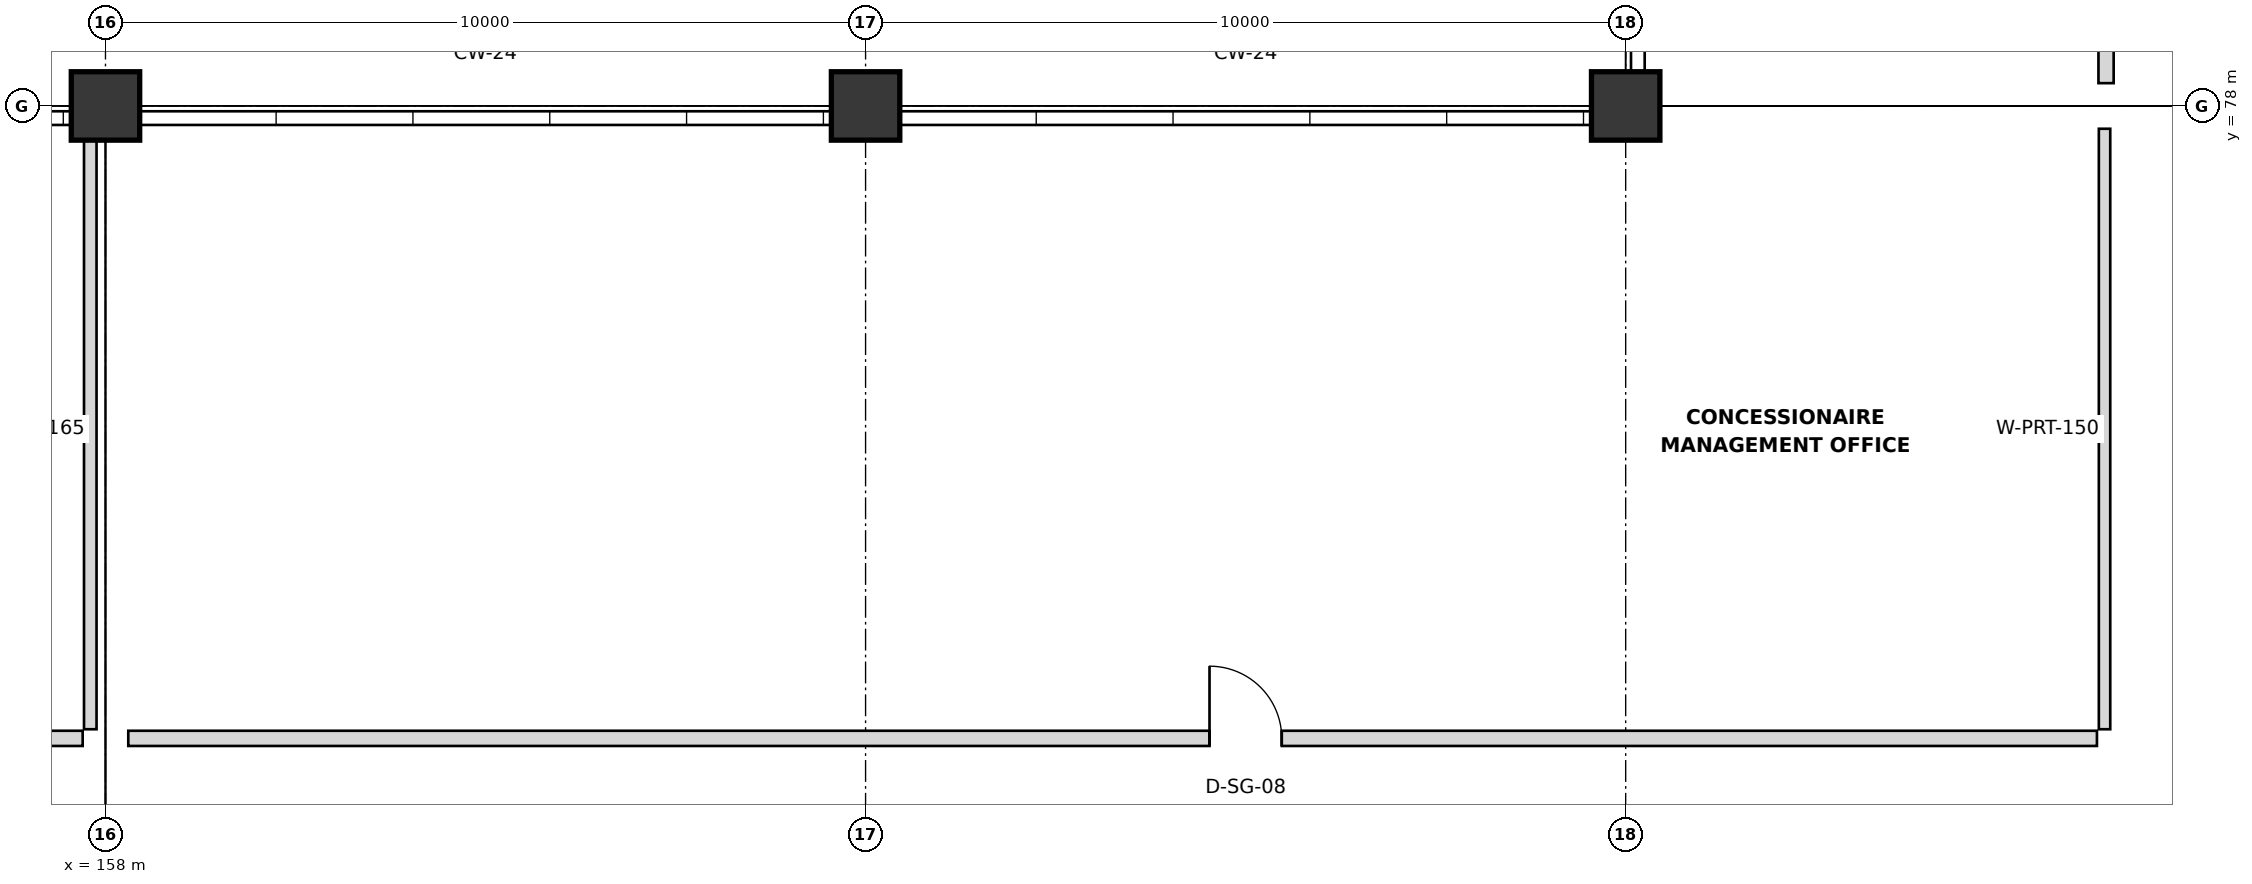
"""IFC4 building model, lengths in metres.
Left out: names, types, materials, properties, quantities, classifications, styles, units other than length and angle.
Written with IfcOpenShell. Run it as: python <this file> out.ifc"""

import sys

from ifc_helpers import new_model, si_unit, direction, frame, frame_2d, origin, origin_2d, place, context, subcontext, project, spatial, rectangle, extrude, element, fill, save


model = new_model("IFC4")
c1 = context("Model", 3, precision=1e-05, world=origin(), true_north=direction((0.0, 1.0)))
c2 = subcontext(c1, "Body", "Model", "MODEL_VIEW")
j1 = project(units=[si_unit("LENGTHUNIT", "METRE"), si_unit("PLANEANGLEUNIT", "RADIAN")], contexts=[c1])
p1 = place(None, origin())
s1 = spatial("IfcSite", under=j1, at=p1, CompositionType="ELEMENT")
p2 = place(p1, origin())
s2 = spatial("IfcBuilding", under=s1, at=p2, CompositionType="ELEMENT")
p3 = place(p2, frame((0.0, 0.0, 5.4)))
s3 = spatial("IfcBuildingStorey", under=s2, at=p3, CompositionType="ELEMENT", Elevation=5.4)
for number, where, z_axis, x_axis in (
    (1, (158.0, 78.0, 0.0), (0.0, 0.0, 1.0), (1.0, 0.0, 0.0)),
    (2, (168.0, 78.0, 0.0), (0.0, 0.0, 1.0), (1.0, 0.0, 0.0)),
    (3, (178.0, 78.0, 0.0), (0.0, 0.0, 1.0), (1.0, 0.0, 0.0)),
):
    element("IfcColumn", number, at=place(p3, frame(where, z_axis=z_axis, x_axis=x_axis)), inside=s3, PredefinedType="COLUMN", context=c2, shape_type="SweptSolid", body=[
        extrude(rectangle(XDim=0.9, YDim=0.9, at=origin_2d()), origin(), (0.0, 0.0, 1.0), 4.2),
    ])
p4 = place(p3, frame((184.32, 78.3, 0.0), z_axis=(0.0, 0.0, 1.0), x_axis=(0.0, 1.0, 0.0)))
e4 = element("IfcWall", 4, at=p4, inside=s3, PredefinedType="PARTITIONING", context=c2, shape_type="SweptSolid", body=[
    extrude(rectangle(XDim=23.4, YDim=0.2, at=frame_2d((11.7, 0.0))), origin(), (0.0, 0.0, 1.0), 3.018),
])
p5 = place(p4, frame((5.125, 0.0, 0.0)))
e5 = element("IfcOpeningElement", 5, at=p5, cuts=e4, PredefinedType="OPENING", context=c2, shape_type="SweptSolid", body=[
    extrude(rectangle(XDim=1.15, YDim=2.3, at=frame_2d((0.575, 1.15))), frame((0.0, 0.11, 0.0), z_axis=(0.0, -1.0, 0.0), x_axis=(1.0, 0.0, 0.0)), (0.0, 0.0, 1.0), 0.22),
])
p6 = place(p3, frame((131.8, 69.68, 0.0), z_axis=(0.0, 0.0, 1.0), x_axis=(1.0, 0.0, 0.0)))
e6 = element("IfcWall", 6, at=p6, inside=s3, PredefinedType="PARTITIONING", context=c2, shape_type="SweptSolid", body=[
    extrude(rectangle(XDim=25.9, YDim=0.2, at=frame_2d((12.95, 0.0))), origin(), (0.0, 0.0, 1.0), 3.118),
])
p7 = place(p6, frame((10.75, 0.0, 0.0)))
e7 = element("IfcOpeningElement", 7, at=p7, cuts=e6, PredefinedType="OPENING", context=c2, shape_type="SweptSolid", body=[
    extrude(rectangle(XDim=0.9, YDim=2.2, at=frame_2d((0.45, 1.1))), frame((0.0, 0.11, 0.0), z_axis=(0.0, -1.0, 0.0), x_axis=(1.0, 0.0, 0.0)), (0.0, 0.0, 1.0), 0.22),
])
p8 = place(p3, frame((157.8, 69.8, 0.0), z_axis=(0.0, 0.0, 1.0), x_axis=(0.0, 1.0, 0.0)))
e8 = element("IfcWall", 8, at=p8, inside=s3, PredefinedType="PARTITIONING", context=c2, shape_type="SweptSolid", body=[
    extrude(rectangle(XDim=7.9, YDim=0.165, at=frame_2d((3.95, 0.0))), origin(), (0.0, 0.0, 1.0), 3.018),
])
p9 = place(p3, frame((158.3, 69.68, 0.0), z_axis=(0.0, 0.0, 1.0), x_axis=(1.0, 0.0, 0.0)))
e9 = element("IfcWall", 9, at=p9, inside=s3, PredefinedType="PARTITIONING", context=c2, shape_type="SweptSolid", body=[
    extrude(rectangle(XDim=25.9, YDim=0.2, at=frame_2d((12.95, 0.0))), origin(), (0.0, 0.0, 1.0), 3.118),
])
p10 = place(p9, frame((14.225, 0.0, 0.0)))
e10 = element("IfcOpeningElement", 10, at=p10, cuts=e9, PredefinedType="OPENING", context=c2, shape_type="SweptSolid", body=[
    extrude(rectangle(XDim=0.95, YDim=2.2, at=frame_2d((0.475, 1.1))), frame((0.0, 0.11, 0.0), z_axis=(0.0, -1.0, 0.0), x_axis=(1.0, 0.0, 0.0)), (0.0, 0.0, 1.0), 0.22),
])
p11 = place(p3, frame((184.3, 69.8, 0.0), z_axis=(0.0, 0.0, 1.0), x_axis=(0.0, 1.0, 0.0)))
e11 = element("IfcWall", 11, at=p11, inside=s3, PredefinedType="PARTITIONING", context=c2, shape_type="SweptSolid", body=[
    extrude(rectangle(XDim=7.9, YDim=0.15, at=frame_2d((3.95, 0.0))), origin(), (0.0, 0.0, 1.0), 3.018),
])
p12 = place(p10, origin())
e12 = element("IfcDoor", 12, at=p12, inside=s3, OperationType="SINGLE_SWING_LEFT", PredefinedType="DOOR", context=c2, shape_type="SweptSolid", body=[
    extrude(rectangle(XDim=0.95, YDim=2.2, at=frame_2d((0.475, 1.1))), frame((0.0, 0.025, 0.0), z_axis=(0.0, -1.0, 0.0), x_axis=(1.0, 0.0, 0.0)), (0.0, 0.0, 1.0), 0.05),
])
fill(e10, e12)
save(model, sys.argv[1])
